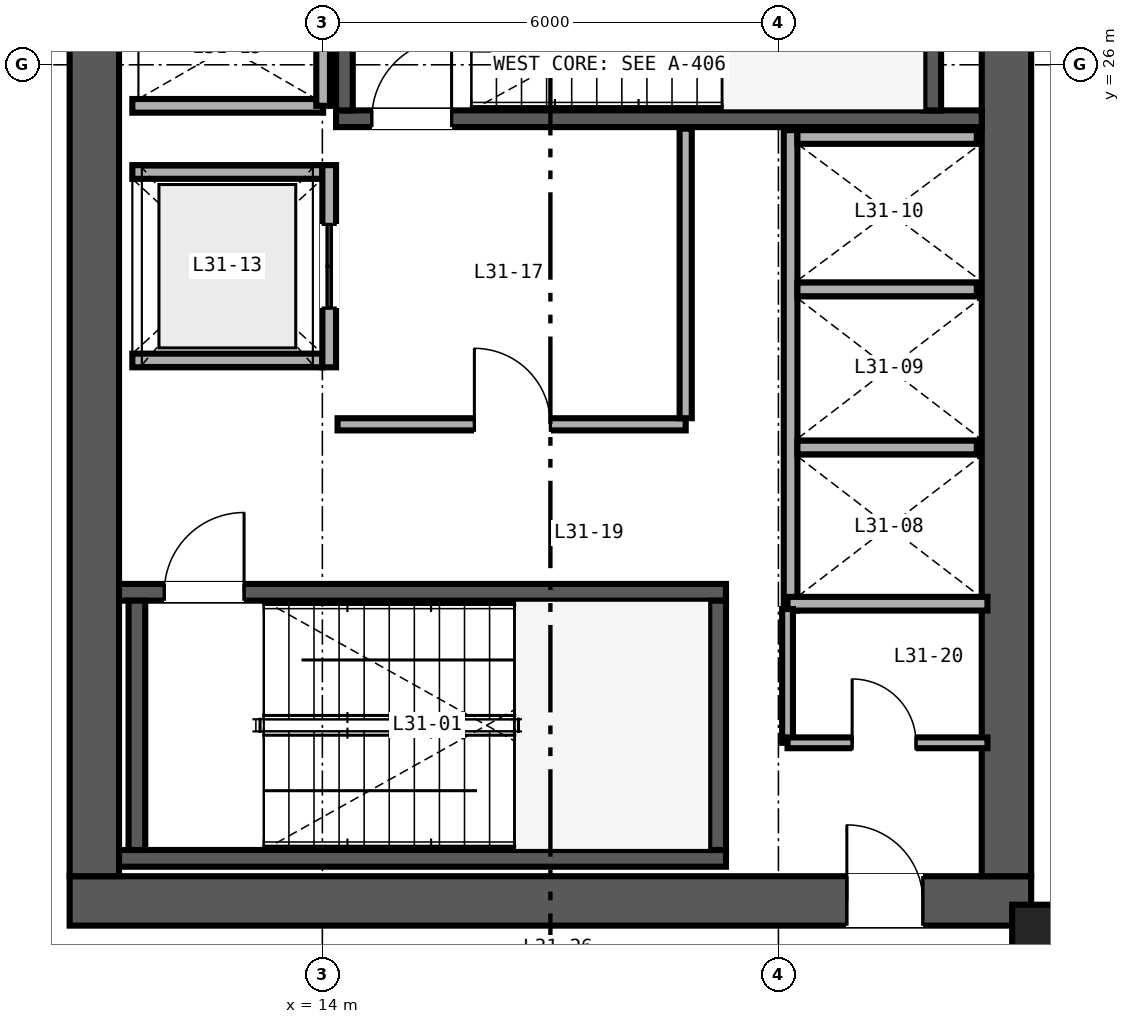
"""IFC4 building model, lengths in metres.
Left out: names, types, materials, properties, quantities, classifications, styles, units other than length and angle.
Written with IfcOpenShell. Run it as: python <this file> out.ifc"""

import sys

from ifc_helpers import new_model, si_unit, direction, frame, frame_2d, origin, origin_2d, place, context, subcontext, project, spatial, rectangle, hollow_rectangle, extrude, source, transform, mapped, element, fill, save


model = new_model("IFC4")
c1 = context("Model", 3, precision=1e-05, world=origin(), true_north=direction((0.0, 1.0)))
c2 = subcontext(c1, "Body", "Model", "MODEL_VIEW")
j1 = project(units=[si_unit("LENGTHUNIT", "METRE"), si_unit("PLANEANGLEUNIT", "RADIAN")], contexts=[c1])
p1 = place(None, origin())
s1 = spatial("IfcSite", under=j1, at=p1, CompositionType="ELEMENT")
p2 = place(p1, origin())
s2 = spatial("IfcBuilding", under=s1, at=p2, CompositionType="ELEMENT")
p3 = place(p2, frame((0.0, 0.0, 126.0)))
s3 = spatial("IfcBuildingStorey", under=s2, at=p3, CompositionType="ELEMENT", Elevation=126.0)
p4 = place(p3, frame((10.675, 15.0, 0.0), z_axis=(0.0, 0.0, 1.0), x_axis=(1.0, 0.0, 0.0)))
e1 = element("IfcWall", 1, at=p4, inside=s3, PredefinedType="SHEAR", context=c2, shape_type="SweptSolid", body=[
    extrude(rectangle(XDim=12.65, YDim=0.65, at=frame_2d((6.325, 0.0))), origin(), (0.0, 0.0, 1.0), 3.36),
])
p5 = place(p4, frame((10.225, 0.0, 0.0)))
e2 = element("IfcOpeningElement", 2, at=p5, cuts=e1, PredefinedType="OPENING", context=c2, shape_type="SweptSolid", body=[
    extrude(rectangle(XDim=1.0, YDim=2.15, at=frame_2d((0.5, 1.075))), frame((0.0, 0.335, 0.0), z_axis=(0.0, -1.0, 0.0), x_axis=(1.0, 0.0, 0.0)), (0.0, 0.0, 1.0), 0.67),
])
for number, where, z_axis, x_axis in (
    (3, (11.0, 15.325, 0.0), (0.0, 0.0, 1.0), (0.0, 1.0, 0.0)),
    (4, (23.0, 15.325, 0.0), (0.0, 0.0, 1.0), (0.0, 1.0, 0.0)),
):
    element("IfcWall", number, at=place(p3, frame(where, z_axis=z_axis, x_axis=x_axis)), inside=s3, PredefinedType="SHEAR", context=c2, shape_type="SweptSolid", body=[
        extrude(rectangle(XDim=21.35, YDim=0.65, at=frame_2d((10.675, 0.0))), origin(), (0.0, 0.0, 1.0), 3.36),
    ])
p6 = place(p3, frame((11.325, 15.56, 0.0), z_axis=(0.0, 0.0, 1.0), x_axis=(1.0, 0.0, 0.0)))
e5 = element("IfcWall", 5, at=p6, inside=s3, PredefinedType="SHEAR", context=c2, shape_type="SweptSolid", body=[
    extrude(rectangle(XDim=7.985, YDim=0.22, at=frame_2d((3.993, 0.0))), origin(), (0.0, 0.0, 1.0), 3.4),
])
p7 = place(p3, frame((11.325, 19.06, 0.0), z_axis=(0.0, 0.0, 1.0), x_axis=(1.0, 0.0, 0.0)))
e6 = element("IfcWall", 6, at=p7, inside=s3, PredefinedType="SHEAR", context=c2, shape_type="SweptSolid", body=[
    extrude(rectangle(XDim=7.985, YDim=0.22, at=frame_2d((3.993, 0.0))), origin(), (0.0, 0.0, 1.0), 3.4),
])
p8 = place(p7, frame((0.595, 0.0, 0.0)))
e7 = element("IfcOpeningElement", 7, at=p8, cuts=e6, PredefinedType="OPENING", context=c2, shape_type="SweptSolid", body=[
    extrude(rectangle(XDim=1.05, YDim=2.15, at=frame_2d((0.525, 1.075))), frame((0.0, 0.12, 0.0), z_axis=(0.0, -1.0, 0.0), x_axis=(1.0, 0.0, 0.0)), (0.0, 0.0, 1.0), 0.24),
])
for number, where, z_axis, x_axis in (
    (8, (11.56, 15.67, 0.0), (0.0, 0.0, 1.0), (0.0, 1.0, 0.0)),
    (9, (19.2, 15.67, 0.0), (0.0, 0.0, 1.0), (0.0, 1.0, 0.0)),
):
    element("IfcWall", number, at=place(p3, frame(where, z_axis=z_axis, x_axis=x_axis)), inside=s3, PredefinedType="SHEAR", context=c2, shape_type="SweptSolid", body=[
        extrude(rectangle(XDim=3.28, YDim=0.22, at=frame_2d((1.64, 0.0))), origin(), (0.0, 0.0, 1.0), 3.4),
    ])
p9 = place(p3, frame((14.18, 25.29, 0.0), z_axis=(0.0, 0.0, 1.0), x_axis=(1.0, 0.0, 0.0)))
e10 = element("IfcWall", 10, at=p9, inside=s3, PredefinedType="SHEAR", context=c2, shape_type="SweptSolid", body=[
    extrude(rectangle(XDim=8.495, YDim=0.22, at=frame_2d((4.248, 0.0))), origin(), (0.0, 0.0, 1.0), 3.4),
])
p10 = place(p9, frame((0.47, 0.0, 0.0)))
e11 = element("IfcOpeningElement", 11, at=p10, cuts=e10, PredefinedType="OPENING", context=c2, shape_type="SweptSolid", body=[
    extrude(rectangle(XDim=1.05, YDim=2.15, at=frame_2d((0.525, 1.075))), frame((0.0, 0.12, 0.0), z_axis=(0.0, -1.0, 0.0), x_axis=(1.0, 0.0, 0.0)), (0.0, 0.0, 1.0), 0.24),
])
for number, where, z_axis, x_axis in (
    (12, (14.29, 25.4, 0.0), (0.0, 0.0, 1.0), (0.0, 1.0, 0.0)),
    (13, (22.03, 25.4, 0.0), (0.0, 0.0, 1.0), (0.0, 1.0, 0.0)),
):
    element("IfcWall", number, at=place(p3, frame(where, z_axis=z_axis, x_axis=x_axis)), inside=s3, PredefinedType="SHEAR", context=c2, shape_type="SweptSolid", body=[
        extrude(rectangle(XDim=3.28, YDim=0.22, at=frame_2d((1.64, 0.0))), origin(), (0.0, 0.0, 1.0), 3.4),
    ])
m1 = source(origin(), c2, "Body", "SweptSolid", [
    extrude(hollow_rectangle(XDim=0.85, YDim=0.8, WallThickness=0.032, at=origin_2d()), origin(), (0.0, 0.0, 1.0), 3.36),
])
p11 = place(p3, frame((23.5, 14.55, 0.0), z_axis=(0.0, 0.0, 1.0), x_axis=(1.0, 0.0, 0.0)))
e14 = element("IfcColumn", 14, at=p11, inside=s3, PredefinedType="COLUMN", context=c2, shape_type="MappedRepresentation", body=[
    mapped(m1, transform((0.0, 0.0, 0.0), scale=1.0)),
])
p12 = place(p3, frame((20.16, 18.82, 0.0), z_axis=(0.0, 0.0, 1.0), x_axis=(0.0, 1.0, 0.0)))
e15 = element("IfcWall", 15, at=p12, inside=s3, PredefinedType="SOLIDWALL", context=c2, shape_type="SweptSolid", body=[
    extrude(rectangle(XDim=6.32, YDim=0.18, at=frame_2d((3.16, 0.0))), origin(), (0.0, 0.0, 1.0), 2.36),
])
p13 = place(p3, frame((20.12, 18.91, 0.0), z_axis=(0.0, 0.0, 1.0), x_axis=(1.0, 0.0, 0.0)))
e16 = element("IfcWall", 16, at=p13, inside=s3, PredefinedType="SOLIDWALL", context=c2, shape_type="SweptSolid", body=[
    extrude(rectangle(XDim=2.63, YDim=0.18, at=frame_2d((1.315, 0.0))), origin(), (0.0, 0.0, 1.0), 3.36),
])
p14 = place(p3, frame((20.25, 25.05, 0.0), z_axis=(0.0, 0.0, 1.0), x_axis=(1.0, 0.0, 0.0)))
e17 = element("IfcWall", 17, at=p14, inside=s3, PredefinedType="SOLIDWALL", context=c2, shape_type="SweptSolid", body=[
    extrude(rectangle(XDim=2.36, YDim=0.18, at=frame_2d((1.18, 0.0))), origin(), (0.0, 0.0, 1.0), 3.36),
])
p15 = place(p3, frame((20.25, 20.965, 0.0), z_axis=(0.0, 0.0, 1.0), x_axis=(1.0, 0.0, 0.0)))
e18 = element("IfcWall", 18, at=p15, inside=s3, PredefinedType="SOLIDWALL", context=c2, shape_type="SweptSolid", body=[
    extrude(rectangle(XDim=2.36, YDim=0.18, at=frame_2d((1.18, 0.0))), origin(), (0.0, 0.0, 1.0), 2.36),
])
p16 = place(p3, frame((20.25, 23.045, 0.0), z_axis=(0.0, 0.0, 1.0), x_axis=(1.0, 0.0, 0.0)))
e19 = element("IfcWall", 19, at=p16, inside=s3, PredefinedType="SOLIDWALL", context=c2, shape_type="SweptSolid", body=[
    extrude(rectangle(XDim=2.36, YDim=0.18, at=frame_2d((1.18, 0.0))), origin(), (0.0, 0.0, 1.0), 3.36),
])
for number, where, z_axis, x_axis in (
    (20, (11.5, 22.11, 0.0), (0.0, 0.0, 1.0), (1.0, 0.0, 0.0)),
    (21, (11.5, 24.59, 0.0), (0.0, 0.0, 1.0), (1.0, 0.0, 0.0)),
):
    element("IfcWall", number, at=place(p3, frame(where, z_axis=z_axis, x_axis=x_axis)), inside=s3, PredefinedType="SOLIDWALL", context=c2, shape_type="SweptSolid", body=[
        extrude(rectangle(XDim=2.5, YDim=0.18, at=frame_2d((1.25, 0.0))), origin(), (0.0, 0.0, 1.0), 3.36),
    ])
p17 = place(p3, frame((14.09, 22.02, 0.0), z_axis=(0.0, 0.0, 1.0), x_axis=(0.0, 1.0, 0.0)))
e22 = element("IfcWall", 22, at=p17, inside=s3, PredefinedType="SOLIDWALL", context=c2, shape_type="SweptSolid", body=[
    extrude(rectangle(XDim=2.66, YDim=0.18, at=frame_2d((1.33, 0.0))), origin(), (0.0, 0.0, 1.0), 3.36),
])
p18 = place(p17, frame((0.78, 0.0, 0.0)))
e23 = element("IfcOpeningElement", 23, at=p18, cuts=e22, PredefinedType="OPENING", context=c2, shape_type="SweptSolid", body=[
    extrude(rectangle(XDim=1.1, YDim=2.2, at=frame_2d((0.55, 1.1))), frame((0.0, 0.1, 0.0), z_axis=(0.0, -1.0, 0.0), x_axis=(1.0, 0.0, 0.0)), (0.0, 0.0, 1.0), 0.2),
])
p19 = place(p3, frame((11.5, 25.46, 0.0), z_axis=(0.0, 0.0, 1.0), x_axis=(1.0, 0.0, 0.0)))
e24 = element("IfcWall", 24, at=p19, inside=s3, PredefinedType="SOLIDWALL", context=c2, shape_type="SweptSolid", body=[
    extrude(rectangle(XDim=2.51, YDim=0.18, at=frame_2d((1.255, 0.0))), origin(), (0.0, 0.0, 1.0), 3.36),
])
p20 = place(p3, frame((14.01, 25.46, 0.0), z_axis=(0.0, 0.0, 1.0), x_axis=(0.0, 1.0, 0.0)))
e25 = element("IfcWall", 25, at=p20, inside=s3, PredefinedType="SOLIDWALL", context=c2, shape_type="SweptSolid", body=[
    extrude(rectangle(XDim=3.08, YDim=0.18, at=frame_2d((1.54, 0.0))), origin(), (0.0, 0.0, 1.0), 3.36),
])
p21 = place(p3, frame((14.2, 21.27, 0.0), z_axis=(0.0, 0.0, 1.0), x_axis=(1.0, 0.0, 0.0)))
e26 = element("IfcWall", 26, at=p21, inside=s3, PredefinedType="PARTITIONING", context=c2, shape_type="SweptSolid", body=[
    extrude(rectangle(XDim=4.58, YDim=0.16, at=frame_2d((2.29, 0.0))), origin(), (0.0, 0.0, 1.0), 3.36),
])
p22 = place(p21, frame((1.8, 0.0, 0.0)))
e27 = element("IfcOpeningElement", 27, at=p22, cuts=e26, PredefinedType="OPENING", context=c2, shape_type="SweptSolid", body=[
    extrude(rectangle(XDim=1.0, YDim=2.15, at=frame_2d((0.5, 1.075))), frame((0.0, 0.09, 0.0), z_axis=(0.0, -1.0, 0.0), x_axis=(1.0, 0.0, 0.0)), (0.0, 0.0, 1.0), 0.18),
])
p23 = place(p3, frame((18.78, 21.35, 0.0), z_axis=(0.0, 0.0, 1.0), x_axis=(0.0, 1.0, 0.0)))
e28 = element("IfcWall", 28, at=p23, inside=s3, PredefinedType="PARTITIONING", context=c2, shape_type="SweptSolid", body=[
    extrude(rectangle(XDim=3.81, YDim=0.16, at=frame_2d((1.905, 0.0))), origin(), (0.0, 0.0, 1.0), 3.36),
])
p24 = place(p3, frame((20.12, 17.08, 0.0), z_axis=(0.0, 0.0, 1.0), x_axis=(0.0, 1.0, 0.0)))
e29 = element("IfcWall", 29, at=p24, inside=s3, PredefinedType="PARTITIONING", context=c2, shape_type="SweptSolid", body=[
    extrude(rectangle(XDim=1.76, YDim=0.142, at=frame_2d((0.88, 0.0))), origin(), (0.0, 0.0, 1.0), 3.36),
])
p25 = place(p3, frame((20.12, 17.08, 0.0), z_axis=(0.0, 0.0, 1.0), x_axis=(1.0, 0.0, 0.0)))
e30 = element("IfcWall", 30, at=p25, inside=s3, PredefinedType="PARTITIONING", context=c2, shape_type="SweptSolid", body=[
    extrude(rectangle(XDim=2.63, YDim=0.142, at=frame_2d((1.315, 0.0))), origin(), (0.0, 0.0, 1.0), 3.36),
])
p26 = place(p25, frame((0.85, 0.0, 0.0)))
e31 = element("IfcOpeningElement", 31, at=p26, cuts=e30, PredefinedType="OPENING", context=c2, shape_type="SweptSolid", body=[
    extrude(rectangle(XDim=0.84, YDim=2.1, at=frame_2d((0.42, 1.05))), frame((0.0, 0.081, 0.0), z_axis=(0.0, -1.0, 0.0), x_axis=(1.0, 0.0, 0.0)), (0.0, 0.0, 1.0), 0.162),
])
m2 = source(origin(), c2, "Body", "SweptSolid", [
    extrude(rectangle(XDim=1.05, YDim=2.15, at=frame_2d((0.525, 1.075))), frame((0.0, 0.025, 0.0), z_axis=(0.0, -1.0, 0.0), x_axis=(1.0, 0.0, 0.0)), (0.0, 0.0, 1.0), 0.05),
])
p27 = place(p8, origin())
e32 = element("IfcDoor", 32, at=p27, inside=s3, OperationType="SINGLE_SWING_RIGHT", PredefinedType="DOOR", context=c2, shape_type="MappedRepresentation", body=[
    mapped(m2, transform((0.0, 0.0, 0.0), scale=1.0)),
])
fill(e7, e32)
p28 = place(p10, origin())
e33 = element("IfcDoor", 33, at=p28, inside=s3, OperationType="SINGLE_SWING_RIGHT", PredefinedType="DOOR", context=c2, shape_type="MappedRepresentation", body=[
    mapped(m2, transform((0.0, 0.0, 0.0), scale=1.0)),
])
fill(e11, e33)
m3 = source(origin(), c2, "Body", "SweptSolid", [
    extrude(rectangle(XDim=1.1, YDim=2.2, at=frame_2d((0.55, 1.1))), frame((0.0, 0.025, 0.0), z_axis=(0.0, -1.0, 0.0), x_axis=(1.0, 0.0, 0.0)), (0.0, 0.0, 1.0), 0.05),
])
p29 = place(p18, origin())
e34 = element("IfcDoor", 34, at=p29, inside=s3, OperationType="DOUBLE_DOOR_SLIDING", PredefinedType="DOOR", context=c2, shape_type="MappedRepresentation", body=[
    mapped(m3, transform((0.0, 0.0, 0.0), scale=1.0)),
])
fill(e23, e34)
m4 = source(origin(), c2, "Body", "SweptSolid", [
    extrude(rectangle(XDim=1.0, YDim=2.15, at=frame_2d((0.5, 1.075))), frame((0.0, 0.025, 0.0), z_axis=(0.0, -1.0, 0.0), x_axis=(1.0, 0.0, 0.0)), (0.0, 0.0, 1.0), 0.05),
])
p30 = place(p22, origin())
e35 = element("IfcDoor", 35, at=p30, inside=s3, OperationType="SINGLE_SWING_LEFT", PredefinedType="DOOR", context=c2, shape_type="MappedRepresentation", body=[
    mapped(m4, transform((0.0, 0.0, 0.0), scale=1.0)),
])
fill(e27, e35)
m5 = source(origin(), c2, "Body", "SweptSolid", [
    extrude(rectangle(XDim=0.84, YDim=2.1, at=frame_2d((0.42, 1.05))), frame((0.0, 0.025, 0.0), z_axis=(0.0, -1.0, 0.0), x_axis=(1.0, 0.0, 0.0)), (0.0, 0.0, 1.0), 0.05),
])
p31 = place(p26, origin())
e36 = element("IfcDoor", 36, at=p31, inside=s3, OperationType="SINGLE_SWING_LEFT", PredefinedType="DOOR", context=c2, shape_type="MappedRepresentation", body=[
    mapped(m5, transform((0.0, 0.0, 0.0), scale=1.0)),
])
fill(e31, e36)
p32 = place(p5, origin())
e37 = element("IfcDoor", 37, at=p32, inside=s3, OperationType="SINGLE_SWING_LEFT", PredefinedType="DOOR", context=c2, shape_type="MappedRepresentation", body=[
    mapped(m4, transform((0.0, 0.0, 0.0), scale=1.0)),
])
fill(e2, e37)
save(model, sys.argv[1])
